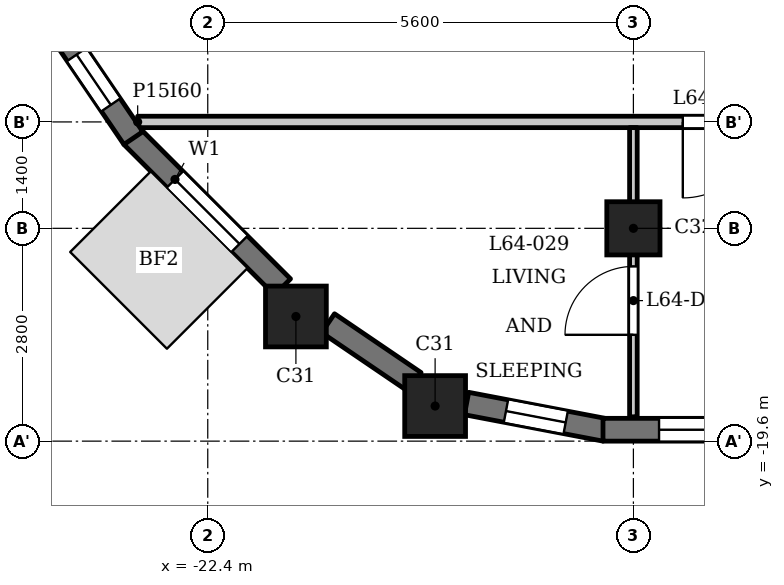
"""IFC4 building model, lengths in metres.
Left out: names, types, materials, properties, quantities, classifications, styles, units other than length and angle.
Written with IfcOpenShell. Run it as: python <this file> out.ifc"""

import sys

from ifc_helpers import new_model, si_unit, direction, frame, frame_2d, origin, origin_2d, place, context, subcontext, project, spatial, rectangle, extrude, element, fill, save


model = new_model("IFC4")
c1 = context("Model", 3, precision=1e-05, world=origin(), true_north=direction((0.0, 1.0)))
c2 = subcontext(c1, "Body", "Model", "MODEL_VIEW")
j1 = project(units=[si_unit("LENGTHUNIT", "METRE"), si_unit("PLANEANGLEUNIT", "RADIAN")], contexts=[c1])
p1 = place(None, origin())
s1 = spatial("IfcSite", under=j1, at=p1, CompositionType="ELEMENT")
p2 = place(p1, origin())
s2 = spatial("IfcBuilding", under=s1, at=p2, CompositionType="ELEMENT")
p3 = place(p2, frame((0.0, 0.0, 248.7)))
s3 = spatial("IfcBuildingStorey", under=s2, at=p3, CompositionType="ELEMENT", Elevation=248.7)
for number, where, z_axis, x_axis in (
    (1, (-19.409, -19.138, 0.0), (0.0, 0.0, 1.0), (1.0, 0.0, 0.0)),
    (2, (-21.24, -17.96, 0.0), (0.0, 0.0, 1.0), (1.0, 0.0, 0.0)),
):
    element("IfcColumn", number, at=place(p3, frame(where, z_axis=z_axis, x_axis=x_axis)), inside=s3, PredefinedType="COLUMN", context=c2, shape_type="SweptSolid", body=[
        extrude(rectangle(XDim=0.8, YDim=0.8, at=origin_2d()), origin(), (0.0, 0.0, 1.0), 3.5),
    ])
p4 = place(p3, frame((-16.8, -16.8, 0.0), z_axis=(0.0, 0.0, 1.0), x_axis=(1.0, 0.0, 0.0)))
e3 = element("IfcColumn", 3, at=p4, inside=s3, PredefinedType="COLUMN", context=c2, shape_type="SweptSolid", body=[
    extrude(rectangle(XDim=0.7, YDim=0.7, at=origin_2d()), origin(), (0.0, 0.0, 1.0), 3.5),
])
p5 = place(p3, frame((-23.397, -15.591, 0.0), z_axis=(0.0, 0.0, 1.0), x_axis=(0.707150377276, -0.707063182409, 0.0)))
e4 = element("IfcWall", 4, at=p5, inside=s3, PredefinedType="SOLIDWALL", context=c2, shape_type="SweptSolid", body=[
    extrude(rectangle(XDim=2.8, YDim=0.3, at=frame_2d((1.4, 0.0))), origin(), (0.0, 0.0, 1.0), 2.55),
])
p6 = place(p5, frame((0.8, 0.0, 0.6)))
e5 = element("IfcOpeningElement", 5, at=p6, cuts=e4, PredefinedType="OPENING", context=c2, shape_type="SweptSolid", body=[
    extrude(rectangle(XDim=1.2, YDim=1.55, at=frame_2d((0.6, 0.775))), frame((0.0, 0.16, 0.0), z_axis=(0.0, -1.0, 0.0), x_axis=(1.0, 0.0, 0.0)), (0.0, 0.0, 1.0), 0.32),
])
p7 = place(p3, frame((-20.817, -18.048, 0.0), z_axis=(0.0, 0.0, 1.0), x_axis=(0.827025410886, -0.562164539747, 0.0)))
e6 = element("IfcWall", 6, at=p7, inside=s3, PredefinedType="SOLIDWALL", context=c2, shape_type="SweptSolid", body=[
    extrude(rectangle(XDim=1.377, YDim=0.3, at=frame_2d((0.688, 0.0))), origin(), (0.0, 0.0, 1.0), 2.55),
])
p8 = place(p3, frame((-18.995, -19.105, 0.0), z_axis=(0.0, 0.0, 1.0), x_axis=(0.982301706131, -0.187305520826, 0.0)))
e7 = element("IfcWall", 7, at=p8, inside=s3, PredefinedType="SOLIDWALL", context=c2, shape_type="SweptSolid", body=[
    extrude(rectangle(XDim=1.856, YDim=0.3, at=frame_2d((0.928, 0.0))), origin(), (0.0, 0.0, 1.0), 2.55),
])
p9 = place(p8, frame((0.528, 0.0, 0.6)))
e8 = element("IfcOpeningElement", 8, at=p9, cuts=e7, PredefinedType="OPENING", context=c2, shape_type="SweptSolid", body=[
    extrude(rectangle(XDim=0.8, YDim=1.55, at=frame_2d((0.4, 0.775))), frame((0.0, 0.16, 0.0), z_axis=(0.0, -1.0, 0.0), x_axis=(1.0, 0.0, 0.0)), (0.0, 0.0, 1.0), 0.32),
])
p10 = place(p3, frame((-17.2, -19.45, 0.0), z_axis=(0.0, 0.0, 1.0), x_axis=(1.0, 0.0, 0.0)))
e9 = element("IfcWall", 9, at=p10, inside=s3, PredefinedType="SOLIDWALL", context=c2, shape_type="SweptSolid", body=[
    extrude(rectangle(XDim=2.8, YDim=0.3, at=frame_2d((1.4, 0.0))), origin(), (0.0, 0.0, 1.0), 2.55),
])
p11 = place(p10, frame((0.738, 0.0, 0.9)))
e10 = element("IfcOpeningElement", 10, at=p11, cuts=e9, PredefinedType="OPENING", context=c2, shape_type="SweptSolid", body=[
    extrude(rectangle(XDim=1.8, YDim=1.25, at=frame_2d((0.9, 0.625))), frame((0.0, 0.16, 0.0), z_axis=(0.0, -1.0, 0.0), x_axis=(1.0, 0.0, 0.0)), (0.0, 0.0, 1.0), 0.32),
])
p12 = place(p3, frame((-24.422, -14.078, 0.0), z_axis=(0.0, 0.0, 1.0), x_axis=(0.562054549384, -0.827100165347, 0.0)))
e11 = element("IfcWall", 11, at=p12, inside=s3, PredefinedType="SOLIDWALL", context=c2, shape_type="SweptSolid", body=[
    extrude(rectangle(XDim=1.856, YDim=0.3, at=frame_2d((0.928, 0.0))), origin(), (0.0, 0.0, 1.0), 2.55),
])
p13 = place(p12, frame((0.528, 0.0, 0.6)))
e12 = element("IfcOpeningElement", 12, at=p13, cuts=e11, PredefinedType="OPENING", context=c2, shape_type="SweptSolid", body=[
    extrude(rectangle(XDim=0.8, YDim=1.55, at=frame_2d((0.4, 0.775))), frame((0.0, 0.16, 0.0), z_axis=(0.0, -1.0, 0.0), x_axis=(1.0, 0.0, 0.0)), (0.0, 0.0, 1.0), 0.32),
])
p14 = place(p3, frame((-23.322, -15.4, 0.0), z_axis=(0.0, 0.0, 1.0), x_axis=(1.0, 0.0, 0.0)))
e13 = element("IfcWall", 13, at=p14, inside=s3, PredefinedType="PARTITIONING", context=c2, shape_type="SweptSolid", body=[
    extrude(rectangle(XDim=46.872, YDim=0.15, at=frame_2d((23.436, 0.0))), origin(), (0.0, 0.0, 1.0), 3.2),
])
p15 = place(p14, frame((7.172, 0.0, 0.0)))
e14 = element("IfcOpeningElement", 14, at=p15, cuts=e13, PredefinedType="OPENING", context=c2, shape_type="SweptSolid", body=[
    extrude(rectangle(XDim=1.0, YDim=2.1, at=frame_2d((0.5, 1.05))), frame((0.0, 0.085, 0.0), z_axis=(0.0, -1.0, 0.0), x_axis=(1.0, 0.0, 0.0)), (0.0, 0.0, 1.0), 0.17),
])
p16 = place(p14, frame((19.372, 0.0, 0.0)))
e15 = element("IfcOpeningElement", 15, at=p16, cuts=e13, PredefinedType="OPENING", context=c2, shape_type="SweptSolid", body=[
    extrude(rectangle(XDim=1.0, YDim=2.1, at=frame_2d((0.5, 1.05))), frame((0.0, 0.085, 0.0), z_axis=(0.0, -1.0, 0.0), x_axis=(1.0, 0.0, 0.0)), (0.0, 0.0, 1.0), 0.17),
])
p17 = place(p14, frame((26.372, 0.0, 0.0)))
e16 = element("IfcOpeningElement", 16, at=p17, cuts=e13, PredefinedType="OPENING", context=c2, shape_type="SweptSolid", body=[
    extrude(rectangle(XDim=1.0, YDim=2.1, at=frame_2d((0.5, 1.05))), frame((0.0, 0.085, 0.0), z_axis=(0.0, -1.0, 0.0), x_axis=(1.0, 0.0, 0.0)), (0.0, 0.0, 1.0), 0.17),
])
p18 = place(p14, frame((38.572, 0.0, 0.0)))
e17 = element("IfcOpeningElement", 17, at=p18, cuts=e13, PredefinedType="OPENING", context=c2, shape_type="SweptSolid", body=[
    extrude(rectangle(XDim=1.0, YDim=2.1, at=frame_2d((0.5, 1.05))), frame((0.0, 0.085, 0.0), z_axis=(0.0, -1.0, 0.0), x_axis=(1.0, 0.0, 0.0)), (0.0, 0.0, 1.0), 0.17),
])
p19 = place(p3, frame((-16.8, -19.28, 0.0), z_axis=(0.0, 0.0, 1.0), x_axis=(0.0, 1.0, 0.0)))
e18 = element("IfcWall", 18, at=p19, inside=s3, PredefinedType="PARTITIONING", context=c2, shape_type="SweptSolid", body=[
    extrude(rectangle(XDim=3.805, YDim=0.1, at=frame_2d((1.902, 0.0))), origin(), (0.0, 0.0, 1.0), 3.2),
])
p20 = place(p19, frame((1.079, 0.0, 0.0)))
e19 = element("IfcOpeningElement", 19, at=p20, cuts=e18, PredefinedType="OPENING", context=c2, shape_type="SweptSolid", body=[
    extrude(rectangle(XDim=0.9, YDim=2.1, at=frame_2d((0.45, 1.05))), frame((0.0, 0.06, 0.0), z_axis=(0.0, -1.0, 0.0), x_axis=(1.0, 0.0, 0.0)), (0.0, 0.0, 1.0), 0.12),
])
p21 = place(p15, origin())
e20 = element("IfcDoor", 20, at=p21, inside=s3, OperationType="SINGLE_SWING_LEFT", PredefinedType="DOOR", context=c2, shape_type="SweptSolid", body=[
    extrude(rectangle(XDim=1.0, YDim=2.1, at=frame_2d((0.5, 1.05))), frame((0.0, 0.025, 0.0), z_axis=(0.0, -1.0, 0.0), x_axis=(1.0, 0.0, 0.0)), (0.0, 0.0, 1.0), 0.05),
])
fill(e14, e20)
p22 = place(p20, origin())
e21 = element("IfcDoor", 21, at=p22, inside=s3, OperationType="SINGLE_SWING_RIGHT", PredefinedType="DOOR", context=c2, shape_type="SweptSolid", body=[
    extrude(rectangle(XDim=0.9, YDim=2.1, at=frame_2d((0.45, 1.05))), frame((0.0, 0.025, 0.0), z_axis=(0.0, -1.0, 0.0), x_axis=(1.0, 0.0, 0.0)), (0.0, 0.0, 1.0), 0.05),
])
fill(e19, e21)
p23 = place(p6, origin())
e22 = element("IfcWindow", 22, at=p23, inside=s3, PartitioningType="SINGLE_PANEL", PredefinedType="WINDOW", context=c2, shape_type="SweptSolid", body=[
    extrude(rectangle(XDim=1.2, YDim=1.55, at=frame_2d((0.6, 0.775))), frame((0.0, 0.03, 0.0), z_axis=(0.0, -1.0, 0.0), x_axis=(1.0, 0.0, 0.0)), (0.0, 0.0, 1.0), 0.06),
])
fill(e5, e22)
p24 = place(p9, origin())
e23 = element("IfcWindow", 23, at=p24, inside=s3, PartitioningType="SINGLE_PANEL", PredefinedType="WINDOW", context=c2, shape_type="SweptSolid", body=[
    extrude(rectangle(XDim=0.8, YDim=1.55, at=frame_2d((0.4, 0.775))), frame((0.0, 0.03, 0.0), z_axis=(0.0, -1.0, 0.0), x_axis=(1.0, 0.0, 0.0)), (0.0, 0.0, 1.0), 0.06),
])
fill(e8, e23)
p25 = place(p11, origin())
e24 = element("IfcWindow", 24, at=p25, inside=s3, PartitioningType="SINGLE_PANEL", PredefinedType="WINDOW", context=c2, shape_type="SweptSolid", body=[
    extrude(rectangle(XDim=1.8, YDim=1.25, at=frame_2d((0.9, 0.625))), frame((0.0, 0.03, 0.0), z_axis=(0.0, -1.0, 0.0), x_axis=(1.0, 0.0, 0.0)), (0.0, 0.0, 1.0), 0.06),
])
fill(e10, e24)
p26 = place(p13, origin())
e25 = element("IfcWindow", 25, at=p26, inside=s3, PartitioningType="SINGLE_PANEL", PredefinedType="WINDOW", context=c2, shape_type="SweptSolid", body=[
    extrude(rectangle(XDim=0.8, YDim=1.55, at=frame_2d((0.4, 0.775))), frame((0.0, 0.03, 0.0), z_axis=(0.0, -1.0, 0.0), x_axis=(1.0, 0.0, 0.0)), (0.0, 0.0, 1.0), 0.06),
])
fill(e12, e25)
save(model, sys.argv[1])
